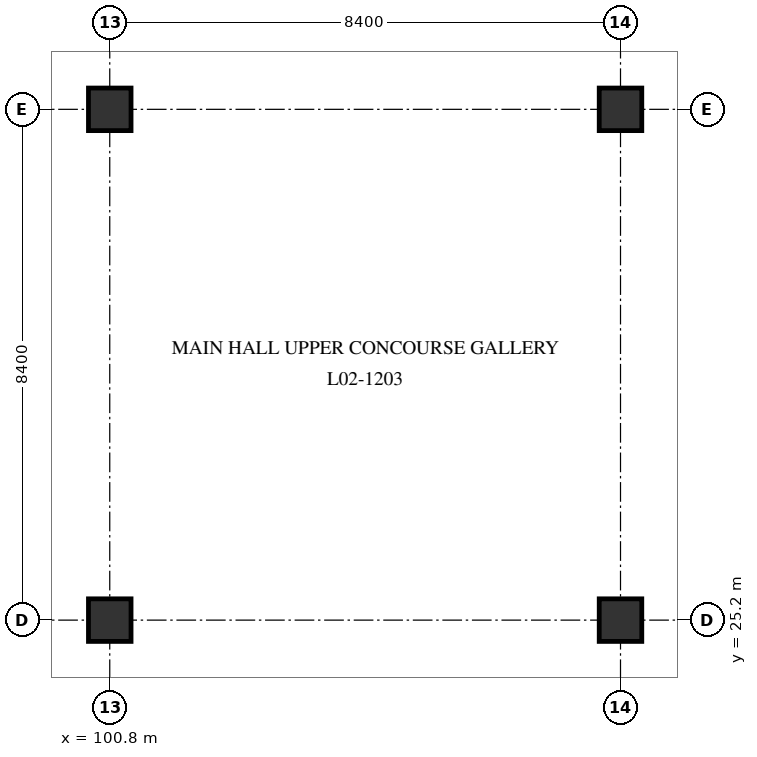
"""IFC4 building model, lengths in metres.
Left out: names, types, materials, properties, quantities, classifications, styles, units other than length and angle.
Written with IfcOpenShell. Run it as: python <this file> out.ifc"""

import sys

from ifc_helpers import new_model, si_unit, direction, frame, origin, origin_2d, place, context, subcontext, project, spatial, rectangle, extrude, element, save


model = new_model("IFC4")
c1 = context("Model", 3, precision=1e-05, world=origin(), true_north=direction((0.0, 1.0)))
c2 = subcontext(c1, "Body", "Model", "MODEL_VIEW")
j1 = project(units=[si_unit("LENGTHUNIT", "METRE"), si_unit("PLANEANGLEUNIT", "RADIAN")], contexts=[c1])
p1 = place(None, origin())
s1 = spatial("IfcSite", under=j1, at=p1, CompositionType="ELEMENT")
p2 = place(p1, origin())
s2 = spatial("IfcBuilding", under=s1, at=p2, CompositionType="ELEMENT")
p3 = place(p2, frame((0.0, 0.0, 9.3)))
s3 = spatial("IfcBuildingStorey", under=s2, at=p3, CompositionType="ELEMENT", Elevation=9.3)
for number, where, z_axis, x_axis in (
    (1, (100.8, 25.2, 0.0), (0.0, 0.0, 1.0), (1.0, 0.0, 0.0)),
    (2, (100.8, 33.6, 0.0), (0.0, 0.0, 1.0), (1.0, 0.0, 0.0)),
    (3, (109.2, 25.2, 0.0), (0.0, 0.0, 1.0), (1.0, 0.0, 0.0)),
    (4, (109.2, 33.6, 0.0), (0.0, 0.0, 1.0), (1.0, 0.0, 0.0)),
):
    element("IfcColumn", number, at=place(p3, frame(where, z_axis=z_axis, x_axis=x_axis)), inside=s3, PredefinedType="COLUMN", context=c2, shape_type="SweptSolid", body=[
        extrude(rectangle(XDim=0.7, YDim=0.7, at=origin_2d()), origin(), (0.0, 0.0, 1.0), 5.1),
    ])
save(model, sys.argv[1])
